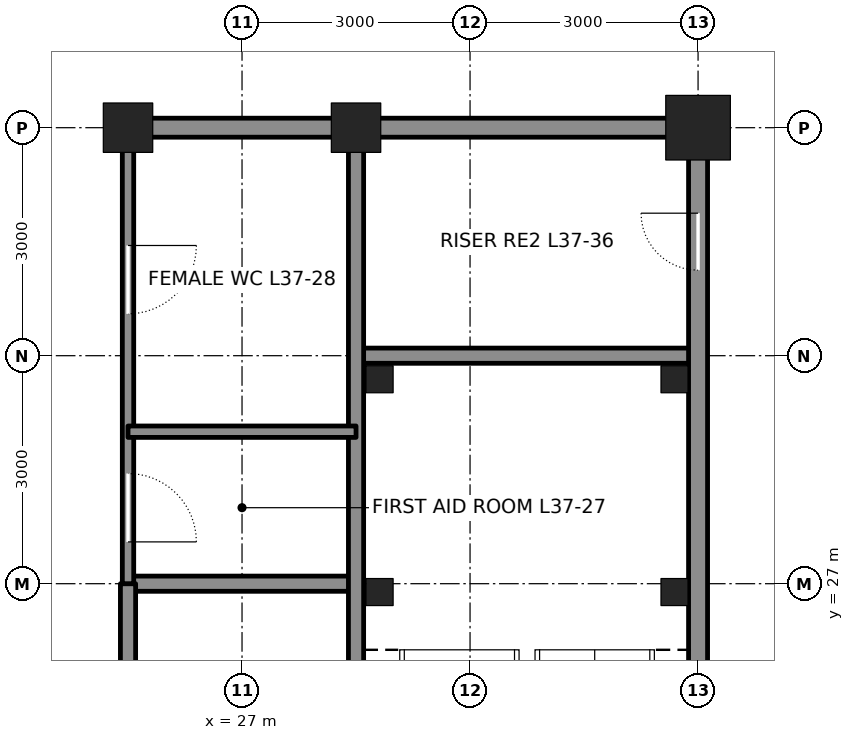
"""IFC4 building model, lengths in metres.
Left out: names, types, materials, properties, quantities, classifications, styles, units other than length and angle.
Written with IfcOpenShell. Run it as: python <this file> out.ifc"""

import sys

from ifc_helpers import new_model, si_unit, direction, frame, frame_2d, origin, origin_2d, place, context, subcontext, project, spatial, rectangle, hollow_rectangle, extrude, element, fill, save


model = new_model("IFC4")
c1 = context("Model", 3, precision=1e-05, world=origin(), true_north=direction((0.0, 1.0)))
c2 = subcontext(c1, "Body", "Model", "MODEL_VIEW")
j1 = project(units=[si_unit("LENGTHUNIT", "METRE"), si_unit("PLANEANGLEUNIT", "RADIAN")], contexts=[c1])
p1 = place(None, origin())
s1 = spatial("IfcSite", under=j1, at=p1, CompositionType="ELEMENT")
p2 = place(p1, origin())
s2 = spatial("IfcBuilding", under=s1, at=p2, CompositionType="ELEMENT")
p3 = place(p2, frame((0.0, 0.0, 169.8)))
s3 = spatial("IfcBuildingStorey", under=s2, at=p3, CompositionType="ELEMENT", Elevation=169.8)
for number, where, z_axis, x_axis in (
    (1, (25.5, 33.0, 0.0), (0.0, 0.0, 1.0), (1.0, 0.0, 0.0)),
    (2, (28.5, 33.0, 0.0), (0.0, 0.0, 1.0), (1.0, 0.0, 0.0)),
):
    element("IfcColumn", number, at=place(p3, frame(where, z_axis=z_axis, x_axis=x_axis)), inside=s3, PredefinedType="COLUMN", context=c2, shape_type="SweptSolid", body=[
        extrude(hollow_rectangle(XDim=0.65, YDim=0.65, WallThickness=0.065, at=origin_2d()), origin(), (0.0, 0.0, 1.0), 4.2),
    ])
p4 = place(p3, frame((33.0, 33.0, 0.0), z_axis=(0.0, 0.0, 1.0), x_axis=(1.0, 0.0, 0.0)))
e3 = element("IfcColumn", 3, at=p4, inside=s3, PredefinedType="COLUMN", context=c2, shape_type="SweptSolid", body=[
    extrude(hollow_rectangle(XDim=0.85, YDim=0.85, WallThickness=0.085, at=origin_2d()), origin(), (0.0, 0.0, 1.0), 4.2),
])
p5 = place(p3, frame((25.5, 27.0, 0.0), z_axis=(0.0, 0.0, 1.0), x_axis=(1.0, 0.0, 0.0)))
e4 = element("IfcWall", 4, at=p5, inside=s3, PredefinedType="SOLIDWALL", context=c2, shape_type="SweptSolid", body=[
    extrude(rectangle(XDim=3.0, YDim=0.2, at=frame_2d((1.5, 0.0))), origin(), (0.0, 0.0, 1.0), 4.04),
])
p6 = place(p3, frame((28.5, 30.0, 0.0), z_axis=(0.0, 0.0, 1.0), x_axis=(1.0, 0.0, 0.0)))
e5 = element("IfcWall", 5, at=p6, inside=s3, PredefinedType="SOLIDWALL", context=c2, shape_type="SweptSolid", body=[
    extrude(rectangle(XDim=4.5, YDim=0.2, at=frame_2d((2.25, 0.0))), origin(), (0.0, 0.0, 1.0), 4.04),
])
p7 = place(p3, frame((25.75, 33.0, 0.0), z_axis=(0.0, 0.0, 1.0), x_axis=(1.0, 0.0, 0.0)))
e6 = element("IfcWall", 6, at=p7, inside=s3, PredefinedType="SOLIDWALL", context=c2, shape_type="SweptSolid", body=[
    extrude(rectangle(XDim=2.5, YDim=0.25, at=frame_2d((1.25, 0.0))), origin(), (0.0, 0.0, 1.0), 3.181),
])
p8 = place(p3, frame((28.75, 33.0, 0.0), z_axis=(0.0, 0.0, 1.0), x_axis=(1.0, 0.0, 0.0)))
e7 = element("IfcWall", 7, at=p8, inside=s3, PredefinedType="SOLIDWALL", context=c2, shape_type="SweptSolid", body=[
    extrude(rectangle(XDim=4.0, YDim=0.25, at=frame_2d((2.0, 0.0))), origin(), (0.0, 0.0, 1.0), 3.181),
])
p9 = place(p3, frame((25.5, 15.0, 0.0), z_axis=(0.0, 0.0, 1.0), x_axis=(0.0, 1.0, 0.0)))
e8 = element("IfcWall", 8, at=p9, inside=s3, PredefinedType="SOLIDWALL", context=c2, shape_type="SweptSolid", body=[
    extrude(rectangle(XDim=12.0, YDim=0.2, at=frame_2d((6.0, 0.0))), origin(), (0.0, 0.0, 1.0), 3.064),
])
p10 = place(p3, frame((25.5, 27.0, 0.0), z_axis=(0.0, 0.0, 1.0), x_axis=(0.0, 1.0, 0.0)))
e9 = element("IfcWall", 9, at=p10, inside=s3, PredefinedType="PARTITIONING", context=c2, shape_type="SweptSolid", body=[
    extrude(rectangle(XDim=5.75, YDim=0.15, at=frame_2d((2.875, 0.0))), origin(), (0.0, 0.0, 1.0), 3.064),
])
p11 = place(p10, frame((0.55, 0.0, 0.0)))
e10 = element("IfcOpeningElement", 10, at=p11, cuts=e9, PredefinedType="OPENING", context=c2, shape_type="SweptSolid", body=[
    extrude(rectangle(XDim=0.9, YDim=2.1, at=frame_2d((0.45, 1.05))), frame((0.0, 0.085, 0.0), z_axis=(0.0, -1.0, 0.0), x_axis=(1.0, 0.0, 0.0)), (0.0, 0.0, 1.0), 0.17),
])
p12 = place(p10, frame((3.55, 0.0, 0.0)))
e11 = element("IfcOpeningElement", 11, at=p12, cuts=e9, PredefinedType="OPENING", context=c2, shape_type="SweptSolid", body=[
    extrude(rectangle(XDim=0.9, YDim=2.1, at=frame_2d((0.45, 1.05))), frame((0.0, 0.085, 0.0), z_axis=(0.0, -1.0, 0.0), x_axis=(1.0, 0.0, 0.0)), (0.0, 0.0, 1.0), 0.17),
])
p13 = place(p3, frame((28.5, 24.25, 0.0), z_axis=(0.0, 0.0, 1.0), x_axis=(0.0, 1.0, 0.0)))
e12 = element("IfcWall", 12, at=p13, inside=s3, PredefinedType="SOLIDWALL", context=c2, shape_type="SweptSolid", body=[
    extrude(rectangle(XDim=8.5, YDim=0.2, at=frame_2d((4.25, 0.0))), origin(), (0.0, 0.0, 1.0), 3.113),
])
p14 = place(p3, frame((33.0, 24.25, 0.0), z_axis=(0.0, 0.0, 1.0), x_axis=(0.0, 1.0, 0.0)))
e13 = element("IfcWall", 13, at=p14, inside=s3, PredefinedType="SOLIDWALL", context=c2, shape_type="SweptSolid", body=[
    extrude(rectangle(XDim=8.5, YDim=0.25, at=frame_2d((4.25, 0.0))), origin(), (0.0, 0.0, 1.0), 3.113),
])
p15 = place(p14, frame((6.875, 0.0, 0.0)))
e14 = element("IfcOpeningElement", 14, at=p15, cuts=e13, PredefinedType="OPENING", context=c2, shape_type="SweptSolid", body=[
    extrude(rectangle(XDim=0.75, YDim=2.1, at=frame_2d((0.375, 1.05))), frame((0.0, 0.135, 0.0), z_axis=(0.0, -1.0, 0.0), x_axis=(1.0, 0.0, 0.0)), (0.0, 0.0, 1.0), 0.27),
])
p16 = place(p3, frame((25.5, 29.0, 0.0), z_axis=(0.0, 0.0, 1.0), x_axis=(1.0, 0.0, 0.0)))
e15 = element("IfcWall", 15, at=p16, inside=s3, PredefinedType="PARTITIONING", context=c2, shape_type="SweptSolid", body=[
    extrude(rectangle(XDim=3.0, YDim=0.15, at=frame_2d((1.5, 0.0))), origin(), (0.0, 0.0, 1.0), 4.04),
])
for number, where, z_axis, x_axis in (
    (16, (28.81, 29.69, 0.0), (0.0, 0.0, 1.0), (1.0, 0.0, 0.0)),
    (17, (32.69, 29.69, 0.0), (0.0, 0.0, 1.0), (1.0, 0.0, 0.0)),
    (18, (28.81, 26.89, 0.0), (0.0, 0.0, 1.0), (1.0, 0.0, 0.0)),
    (19, (32.69, 26.89, 0.0), (0.0, 0.0, 1.0), (1.0, 0.0, 0.0)),
):
    element("IfcColumn", number, at=place(p3, frame(where, z_axis=z_axis, x_axis=x_axis)), inside=s3, PredefinedType="COLUMN", context=c2, shape_type="SweptSolid", body=[
        extrude(hollow_rectangle(XDim=0.356, YDim=0.356, WallThickness=0.015, at=origin_2d()), origin(), (0.0, 0.0, 1.0), 4.2),
    ])
p17 = place(p15, origin())
e20 = element("IfcDoor", 20, at=p17, inside=s3, OperationType="SINGLE_SWING_RIGHT", PredefinedType="DOOR", context=c2, shape_type="SweptSolid", body=[
    extrude(rectangle(XDim=0.75, YDim=2.1, at=frame_2d((0.375, 1.05))), frame((0.0, 0.025, 0.0), z_axis=(0.0, -1.0, 0.0), x_axis=(1.0, 0.0, 0.0)), (0.0, 0.0, 1.0), 0.05),
])
fill(e14, e20)
p18 = place(p11, frame((0.9, 0.0, 0.0), z_axis=(0.0, 0.0, 1.0), x_axis=(-1.0, 0.0, 0.0)))
e21 = element("IfcDoor", 21, at=p18, inside=s3, OperationType="SINGLE_SWING_RIGHT", PredefinedType="DOOR", context=c2, shape_type="SweptSolid", body=[
    extrude(rectangle(XDim=0.9, YDim=2.1, at=frame_2d((0.45, 1.05))), frame((0.0, 0.025, 0.0), z_axis=(0.0, -1.0, 0.0), x_axis=(1.0, 0.0, 0.0)), (0.0, 0.0, 1.0), 0.05),
])
fill(e10, e21)
p19 = place(p12, frame((0.9, 0.0, 0.0), z_axis=(0.0, 0.0, 1.0), x_axis=(-1.0, 0.0, 0.0)))
e22 = element("IfcDoor", 22, at=p19, inside=s3, OperationType="SINGLE_SWING_LEFT", PredefinedType="DOOR", context=c2, shape_type="SweptSolid", body=[
    extrude(rectangle(XDim=0.9, YDim=2.1, at=frame_2d((0.45, 1.05))), frame((0.0, 0.025, 0.0), z_axis=(0.0, -1.0, 0.0), x_axis=(1.0, 0.0, 0.0)), (0.0, 0.0, 1.0), 0.05),
])
fill(e11, e22)
save(model, sys.argv[1])
